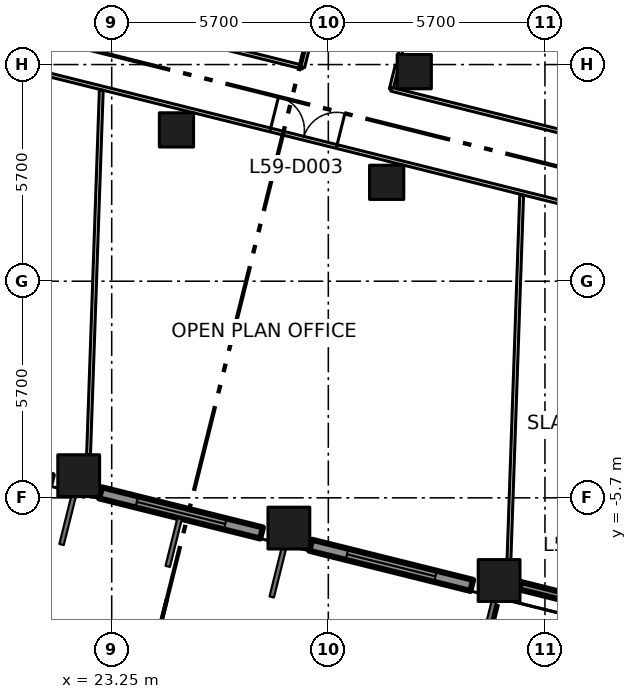
"""IFC4 building model, lengths in metres.
Left out: names, types, materials, properties, quantities, classifications, styles, units other than length and angle.
Written with IfcOpenShell. Run it as: python <this file> out.ifc"""

import sys

from ifc_helpers import new_model, si_unit, direction, frame, frame_2d, origin, origin_2d, place, context, subcontext, project, spatial, rectangle, extrude, element, fill, save


model = new_model("IFC4")
c1 = context("Model", 3, precision=1e-05, world=origin(), true_north=direction((0.0, 1.0)))
c2 = subcontext(c1, "Body", "Model", "MODEL_VIEW")
j1 = project(units=[si_unit("LENGTHUNIT", "METRE"), si_unit("PLANEANGLEUNIT", "RADIAN")], contexts=[c1])
p1 = place(None, origin())
s1 = spatial("IfcSite", under=j1, at=p1, CompositionType="ELEMENT")
p2 = place(p1, origin())
s2 = spatial("IfcBuilding", under=s1, at=p2, CompositionType="ELEMENT")
p3 = place(p2, frame((0.0, 0.0, 259.2)))
s3 = spatial("IfcBuildingStorey", under=s2, at=p3, CompositionType="ELEMENT", Elevation=259.2)
for number, where, z_axis, x_axis in (
    (1, (22.382, -5.117, 0.0), (0.0, 0.0, 1.0), (1.0, 0.0, 0.0)),
    (2, (27.912, -6.496, 0.0), (0.0, 0.0, 1.0), (1.0, 0.0, 0.0)),
    (3, (33.443, -7.875, 0.0), (0.0, 0.0, 1.0), (1.0, 0.0, 0.0)),
):
    element("IfcColumn", number, at=place(p3, frame(where, z_axis=z_axis, x_axis=x_axis)), inside=s3, PredefinedType="COLUMN", context=c2, shape_type="SweptSolid", body=[
        extrude(rectangle(XDim=1.1, YDim=1.1, at=origin_2d()), origin(), (0.0, 0.0, 1.0), 4.2),
    ])
for number, where, z_axis, x_axis in (
    (4, (24.954, 3.981, 0.0), (0.0, 0.0, 1.0), (1.0, 0.0, 0.0)),
    (5, (30.485, 2.602, 0.0), (0.0, 0.0, 1.0), (1.0, 0.0, 0.0)),
    (6, (31.211, 5.513, 0.0), (0.0, 0.0, 1.0), (1.0, 0.0, 0.0)),
):
    element("IfcColumn", number, at=place(p3, frame(where, z_axis=z_axis, x_axis=x_axis)), inside=s3, PredefinedType="COLUMN", context=c2, shape_type="SweptSolid", body=[
        extrude(rectangle(XDim=0.9, YDim=0.9, at=origin_2d()), origin(), (0.0, 0.0, 1.0), 4.2),
    ])
p4 = place(p3, frame((17.425, -4.19, 0.0), z_axis=(0.0, 0.0, 1.0), x_axis=(0.970270592847, -0.242022677978, 0.0)))
e7 = element("IfcWall", 7, at=p4, inside=s3, PredefinedType="SOLIDWALL", context=c2, shape_type="SweptSolid", body=[
    extrude(rectangle(XDim=4.368, YDim=0.3, at=frame_2d((2.184, 0.0))), origin(), (0.0, 0.0, 1.0), 3.15),
])
p5 = place(p4, frame((0.983, 0.0, 0.8)))
e8 = element("IfcOpeningElement", 8, at=p5, cuts=e7, PredefinedType="OPENING", context=c2, shape_type="SweptSolid", body=[
    extrude(rectangle(XDim=2.4, YDim=2.1, at=frame_2d((1.2, 1.05))), frame((0.0, 0.16, 0.0), z_axis=(0.0, -1.0, 0.0), x_axis=(1.0, 0.0, 0.0)), (0.0, 0.0, 1.0), 0.32),
])
p6 = place(p3, frame((22.956, -5.569, 0.0), z_axis=(0.0, 0.0, 1.0), x_axis=(0.970323116569, -0.241812012628, 0.0)))
e9 = element("IfcWall", 9, at=p6, inside=s3, PredefinedType="SOLIDWALL", context=c2, shape_type="SweptSolid", body=[
    extrude(rectangle(XDim=4.367, YDim=0.3, at=frame_2d((2.183, 0.0))), origin(), (0.0, 0.0, 1.0), 3.15),
])
p7 = place(p6, frame((0.983, 0.0, 0.8)))
e10 = element("IfcOpeningElement", 10, at=p7, cuts=e9, PredefinedType="OPENING", context=c2, shape_type="SweptSolid", body=[
    extrude(rectangle(XDim=2.4, YDim=2.1, at=frame_2d((1.2, 1.05))), frame((0.0, 0.16, 0.0), z_axis=(0.0, -1.0, 0.0), x_axis=(1.0, 0.0, 0.0)), (0.0, 0.0, 1.0), 0.32),
])
p8 = place(p3, frame((28.486, -6.948, 0.0), z_axis=(0.0, 0.0, 1.0), x_axis=(0.970336189295, -0.241759549438, 0.0)))
e11 = element("IfcWall", 11, at=p8, inside=s3, PredefinedType="SOLIDWALL", context=c2, shape_type="SweptSolid", body=[
    extrude(rectangle(XDim=4.368, YDim=0.3, at=frame_2d((2.184, 0.0))), origin(), (0.0, 0.0, 1.0), 3.15),
])
p9 = place(p8, frame((0.983, 0.0, 0.8)))
e12 = element("IfcOpeningElement", 12, at=p9, cuts=e11, PredefinedType="OPENING", context=c2, shape_type="SweptSolid", body=[
    extrude(rectangle(XDim=2.4, YDim=2.1, at=frame_2d((1.2, 1.05))), frame((0.0, 0.16, 0.0), z_axis=(0.0, -1.0, 0.0), x_axis=(1.0, 0.0, 0.0)), (0.0, 0.0, 1.0), 0.32),
])
p10 = place(p3, frame((33.993, -8.012, 0.0), z_axis=(0.0, 0.0, 1.0), x_axis=(0.970337166083, -0.241755628927, 0.0)))
e13 = element("IfcWall", 13, at=p10, inside=s3, PredefinedType="SOLIDWALL", context=c2, shape_type="SweptSolid", body=[
    extrude(rectangle(XDim=4.567, YDim=0.2, at=frame_2d((2.283, 0.0))), origin(), (0.0, 0.0, 1.0), 3.15),
])
p11 = place(p10, frame((1.383, 0.0, 0.0)))
e14 = element("IfcOpeningElement", 14, at=p11, cuts=e13, PredefinedType="OPENING", context=c2, shape_type="SweptSolid", body=[
    extrude(rectangle(XDim=1.8, YDim=2.9, at=frame_2d((0.9, 1.45))), frame((0.0, 0.11, 0.0), z_axis=(0.0, -1.0, 0.0), x_axis=(1.0, 0.0, 0.0)), (0.0, 0.0, 1.0), 0.22),
])
p12 = place(p3, frame((8.55, 8.685, 0.0), z_axis=(0.0, 0.0, 1.0), x_axis=(0.970298026101, -0.241912671319, 0.0)))
e15 = element("IfcWall", 15, at=p12, inside=s3, PredefinedType="PARTITIONING", context=c2, shape_type="SweptSolid", body=[
    extrude(rectangle(XDim=51.275, YDim=0.1, at=frame_2d((25.637, 0.0))), origin(), (0.0, 0.0, 1.0), 3.9),
])
p13 = place(p12, frame((19.45, 0.0, 0.0)))
e16 = element("IfcOpeningElement", 16, at=p13, cuts=e15, PredefinedType="OPENING", context=c2, shape_type="SweptSolid", body=[
    extrude(rectangle(XDim=1.8, YDim=2.1, at=frame_2d((0.9, 1.05))), frame((0.0, 0.06, 0.0), z_axis=(0.0, -1.0, 0.0), x_axis=(1.0, 0.0, 0.0)), (0.0, 0.0, 1.0), 0.12),
])
p14 = place(p12, frame((31.35, 0.0, 0.0)))
e17 = element("IfcOpeningElement", 17, at=p14, cuts=e15, PredefinedType="OPENING", context=c2, shape_type="SweptSolid", body=[
    extrude(rectangle(XDim=1.8, YDim=2.1, at=frame_2d((0.9, 1.05))), frame((0.0, 0.06, 0.0), z_axis=(0.0, -1.0, 0.0), x_axis=(1.0, 0.0, 0.0)), (0.0, 0.0, 1.0), 0.12),
])
p15 = place(p12, frame((6.18, 0.0, 0.0)))
e18 = element("IfcOpeningElement", 18, at=p15, cuts=e15, PredefinedType="OPENING", context=c2, shape_type="SweptSolid", body=[
    extrude(rectangle(XDim=1.8, YDim=2.1, at=frame_2d((0.9, 1.05))), frame((0.0, 0.06, 0.0), z_axis=(0.0, -1.0, 0.0), x_axis=(1.0, 0.0, 0.0)), (0.0, 0.0, 1.0), 0.12),
])
p16 = place(p3, frame((8.988, 10.44, 0.0), z_axis=(0.0, 0.0, 1.0), x_axis=(0.970301223092, -0.241899848006, 0.0)))
e19 = element("IfcWall", 19, at=p16, inside=s3, PredefinedType="PARTITIONING", context=c2, shape_type="SweptSolid", body=[
    extrude(rectangle(XDim=19.879, YDim=0.1, at=frame_2d((9.94, 0.0))), origin(), (0.0, 0.0, 1.0), 3.9),
])
p17 = place(p3, frame((30.259, 13.583, 0.0), z_axis=(0.0, 0.0, 1.0), x_axis=(-0.241841612879, -0.970315739479, 0.0)))
e20 = element("IfcWall", 20, at=p17, inside=s3, PredefinedType="PARTITIONING", context=c2, shape_type="SweptSolid", body=[
    extrude(rectangle(XDim=8.195, YDim=0.1, at=frame_2d((4.098, 0.0))), origin(), (0.0, 0.0, 1.0), 3.9),
])
p18 = place(p17, frame((3.88, 0.0, 0.0)))
e21 = element("IfcOpeningElement", 21, at=p18, cuts=e20, PredefinedType="OPENING", context=c2, shape_type="SweptSolid", body=[
    extrude(rectangle(XDim=1.0, YDim=2.1, at=frame_2d((0.5, 1.05))), frame((0.0, 0.06, 0.0), z_axis=(0.0, -1.0, 0.0), x_axis=(1.0, 0.0, 0.0)), (0.0, 0.0, 1.0), 0.12),
])
p19 = place(p3, frame((30.605, 5.05, 0.0), z_axis=(0.0, 0.0, 1.0), x_axis=(0.241823201882, 0.970320328052, 0.0)))
e22 = element("IfcWall", 22, at=p19, inside=s3, PredefinedType="PARTITIONING", context=c2, shape_type="SweptSolid", body=[
    extrude(rectangle(XDim=0.645, YDim=0.1, at=frame_2d((0.323, 0.0))), origin(), (0.0, 0.0, 1.0), 3.9),
])
p20 = place(p3, frame((30.833, 5.963, 0.0), z_axis=(0.0, 0.0, 1.0), x_axis=(0.241902093757, 0.970300663215, 0.0)))
e23 = element("IfcWall", 23, at=p20, inside=s3, PredefinedType="PARTITIONING", context=c2, shape_type="SweptSolid", body=[
    extrude(rectangle(XDim=7.255, YDim=0.1, at=frame_2d((3.627, 0.0))), origin(), (0.0, 0.0, 1.0), 3.9),
])
p21 = place(p20, frame((2.68, 0.0, 0.0)))
e24 = element("IfcOpeningElement", 24, at=p21, cuts=e23, PredefinedType="OPENING", context=c2, shape_type="SweptSolid", body=[
    extrude(rectangle(XDim=1.8, YDim=2.1, at=frame_2d((0.9, 1.05))), frame((0.0, 0.06, 0.0), z_axis=(0.0, -1.0, 0.0), x_axis=(1.0, 0.0, 0.0)), (0.0, 0.0, 1.0), 0.12),
])
p22 = place(p3, frame((49.551, 0.327, 0.0), z_axis=(0.0, 0.0, 1.0), x_axis=(-0.970303359745, 0.241891277369, 0.0)))
e25 = element("IfcWall", 25, at=p22, inside=s3, PredefinedType="PARTITIONING", context=c2, shape_type="SweptSolid", body=[
    extrude(rectangle(XDim=19.526, YDim=0.1, at=frame_2d((9.763, 0.0))), origin(), (0.0, 0.0, 1.0), 3.9),
])
p23 = place(p3, frame((22.641, -4.567, 0.0), z_axis=(0.0, 0.0, 1.0), x_axis=(0.034896781654, 0.999390921827, 0.0)))
e26 = element("IfcWall", 26, at=p23, inside=s3, PredefinedType="PARTITIONING", context=c2, shape_type="SweptSolid", body=[
    extrude(rectangle(XDim=9.599, YDim=0.1, at=frame_2d((4.799, 0.0))), origin(), (0.0, 0.0, 1.0), 3.9),
])
p24 = place(p3, frame((33.703, -7.325, 0.0), z_axis=(0.0, 0.0, 1.0), x_axis=(0.034823224935, 0.999393487574, 0.0)))
e27 = element("IfcWall", 27, at=p24, inside=s3, PredefinedType="PARTITIONING", context=c2, shape_type="SweptSolid", body=[
    extrude(rectangle(XDim=9.598, YDim=0.1, at=frame_2d((4.799, 0.0))), origin(), (0.0, 0.0, 1.0), 3.9),
])
p25 = place(p7, origin())
e28 = element("IfcWindow", 28, at=p25, inside=s3, PartitioningType="DOUBLE_PANEL_VERTICAL", PredefinedType="WINDOW", context=c2, shape_type="SweptSolid", body=[
    extrude(rectangle(XDim=2.4, YDim=2.1, at=frame_2d((1.2, 1.05))), frame((0.0, 0.03, 0.0), z_axis=(0.0, -1.0, 0.0), x_axis=(1.0, 0.0, 0.0)), (0.0, 0.0, 1.0), 0.06),
])
fill(e10, e28)
p26 = place(p9, origin())
e29 = element("IfcWindow", 29, at=p26, inside=s3, PartitioningType="DOUBLE_PANEL_VERTICAL", PredefinedType="WINDOW", context=c2, shape_type="SweptSolid", body=[
    extrude(rectangle(XDim=2.4, YDim=2.1, at=frame_2d((1.2, 1.05))), frame((0.0, 0.03, 0.0), z_axis=(0.0, -1.0, 0.0), x_axis=(1.0, 0.0, 0.0)), (0.0, 0.0, 1.0), 0.06),
])
fill(e12, e29)
p27 = place(p13, origin())
e30 = element("IfcDoor", 30, at=p27, inside=s3, OperationType="DOUBLE_DOOR_SINGLE_SWING", PredefinedType="DOOR", context=c2, shape_type="SweptSolid", body=[
    extrude(rectangle(XDim=1.8, YDim=2.1, at=frame_2d((0.9, 1.05))), frame((0.0, 0.025, 0.0), z_axis=(0.0, -1.0, 0.0), x_axis=(1.0, 0.0, 0.0)), (0.0, 0.0, 1.0), 0.05),
])
fill(e16, e30)
save(model, sys.argv[1])
